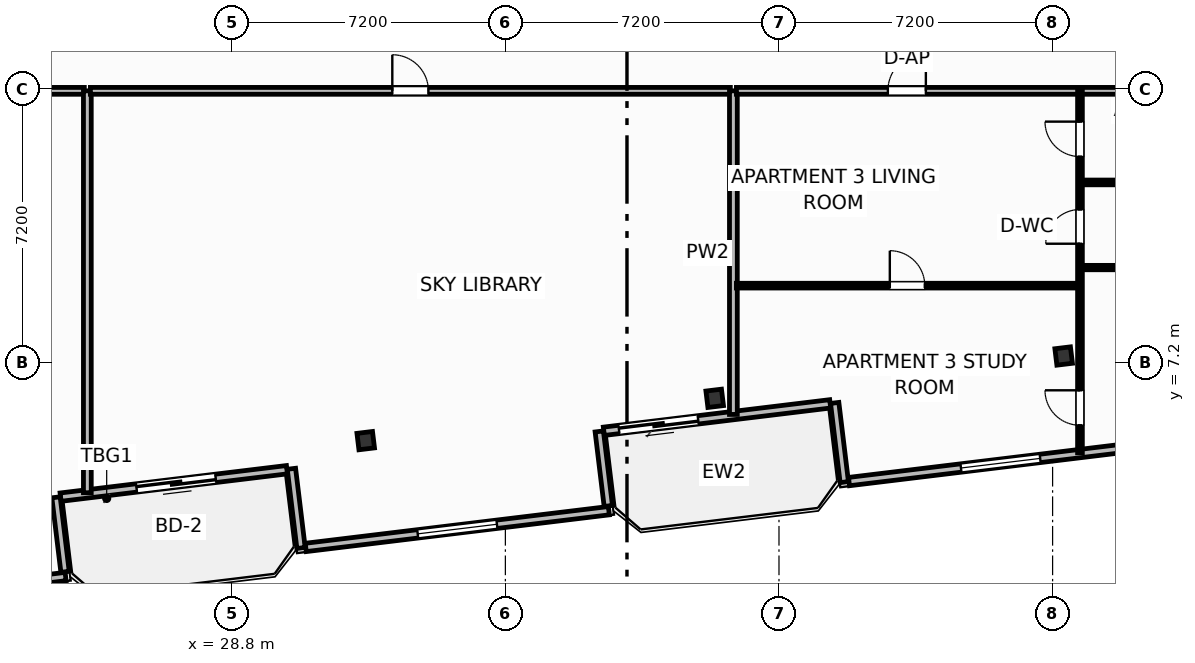
"""IFC4 building model, lengths in metres.
Left out: names, types, materials, properties, quantities, classifications, styles, units other than length and angle.
Written with IfcOpenShell. Run it as: python <this file> out.ifc"""

import sys

from ifc_helpers import new_model, si_unit, direction, frame, frame_2d, origin, origin_2d, place, context, subcontext, project, spatial, rectangle, i_section, extrude, element, fill, save


model = new_model("IFC4")
c1 = context("Model", 3, precision=1e-05, world=origin(), true_north=direction((0.0, 1.0)))
c2 = subcontext(c1, "Body", "Model", "MODEL_VIEW")
j1 = project(units=[si_unit("LENGTHUNIT", "METRE"), si_unit("PLANEANGLEUNIT", "RADIAN")], contexts=[c1])
p1 = place(None, origin())
s1 = spatial("IfcSite", under=j1, at=p1, CompositionType="ELEMENT")
p2 = place(p1, origin())
s2 = spatial("IfcBuilding", under=s1, at=p2, CompositionType="ELEMENT")
p3 = place(p2, frame((0.0, 0.0, 182.0)))
s3 = spatial("IfcBuildingStorey", under=s2, at=p3, CompositionType="ELEMENT", Elevation=182.0)
for number, where, z_axis, x_axis in (
    (1, (32.325, 5.146, 0.0), (0.0, 0.0, 1.0), (0.993, 0.12, 0.0)),
    (2, (41.508, 6.26, 0.0), (0.0, 0.0, 1.0), (0.993, 0.12, 0.0)),
    (3, (50.691, 7.373, 0.0), (0.0, 0.0, 1.0), (0.993, 0.12, 0.0)),
):
    element("IfcColumn", number, at=place(p3, frame(where, z_axis=z_axis, x_axis=x_axis)), inside=s3, PredefinedType="COLUMN", context=c2, shape_type="SweptSolid", body=[
        extrude(i_section(OverallWidth=0.412, OverallDepth=0.435, WebThickness=0.036, FlangeThickness=0.057, FilletRadius=0.025, at=origin_2d()), origin(), (0.0, 0.0, 1.0), 3.7),
    ])
p4 = place(p3, frame((30.252, 4.381, 0.0), z_axis=(0.0, 0.0, 1.0), x_axis=(-0.992735402148, -0.120318000826, 0.0)))
e4 = element("IfcWall", 4, at=p4, inside=s3, PredefinedType="SOLIDWALL", context=c2, shape_type="SweptSolid", body=[
    extrude(rectangle(XDim=6.0, YDim=0.22, at=frame_2d((3.0, 0.0))), origin(), (0.0, 0.0, 1.0), 2.73),
])
p5 = place(p4, frame((1.888, 0.0, 0.0)))
e5 = element("IfcOpeningElement", 5, at=p5, cuts=e4, PredefinedType="OPENING", context=c2, shape_type="SweptSolid", body=[
    extrude(rectangle(XDim=2.1, YDim=2.3, at=frame_2d((1.05, 1.15))), frame((0.0, 0.12, 0.0), z_axis=(0.0, -1.0, 0.0), x_axis=(1.0, 0.0, 0.0)), (0.0, 0.0, 1.0), 0.24),
])
p6 = place(p3, frame((44.548, 6.114, 0.0), z_axis=(0.0, 0.0, 1.0), x_axis=(-0.992735402148, -0.120318000826, 0.0)))
e6 = element("IfcWall", 6, at=p6, inside=s3, PredefinedType="SOLIDWALL", context=c2, shape_type="SweptSolid", body=[
    extrude(rectangle(XDim=6.0, YDim=0.22, at=frame_2d((3.0, 0.0))), origin(), (0.0, 0.0, 1.0), 2.73),
])
p7 = place(p6, frame((3.5, 0.0, 0.0)))
e7 = element("IfcOpeningElement", 7, at=p7, cuts=e6, PredefinedType="OPENING", context=c2, shape_type="SweptSolid", body=[
    extrude(rectangle(XDim=2.1, YDim=2.3, at=frame_2d((1.05, 1.15))), frame((0.0, 0.12, 0.0), z_axis=(0.0, -1.0, 0.0), x_axis=(1.0, 0.0, 0.0)), (0.0, 0.0, 1.0), 0.24),
])
p8 = place(p3, frame((11.972, 0.06, 0.0), z_axis=(0.0, 0.0, 1.0), x_axis=(0.992732021049, 0.120345894751, 0.0)))
e8 = element("IfcWall", 8, at=p8, inside=s3, PredefinedType="SOLIDWALL", context=c2, shape_type="SweptSolid", body=[
    extrude(rectangle(XDim=12.547, YDim=0.22, at=frame_2d((6.274, 0.0))), origin(), (0.0, 0.0, 1.0), 2.73),
])
p9 = place(p8, frame((5.224, 0.0, 0.8)))
e9 = element("IfcOpeningElement", 9, at=p9, cuts=e8, PredefinedType="OPENING", context=c2, shape_type="SweptSolid", body=[
    extrude(rectangle(XDim=2.1, YDim=1.75, at=frame_2d((1.05, 0.875))), frame((0.0, 0.12, 0.0), z_axis=(0.0, -1.0, 0.0), x_axis=(1.0, 0.0, 0.0)), (0.0, 0.0, 1.0), 0.24),
])
p10 = place(p3, frame((24.413, 1.694, 0.0), z_axis=(0.0, 0.0, 1.0), x_axis=(-0.120290754542, 0.992738703976, 0.0)))
e10 = element("IfcWall", 10, at=p10, inside=s3, PredefinedType="SOLIDWALL", context=c2, shape_type="SweptSolid", body=[
    extrude(rectangle(XDim=1.975, YDim=0.22, at=frame_2d((0.987, 0.0))), origin(), (0.0, 0.0, 1.0), 2.73),
])
p11 = place(p3, frame((30.37, 4.406, 0.0), z_axis=(0.0, 0.0, 1.0), x_axis=(0.120327895535, -0.992734202874, 0.0)))
e11 = element("IfcWall", 11, at=p11, inside=s3, PredefinedType="SOLIDWALL", context=c2, shape_type="SweptSolid", body=[
    extrude(rectangle(XDim=2.1, YDim=0.22, at=frame_2d((1.05, 0.0))), origin(), (0.0, 0.0, 1.0), 2.73),
])
p12 = place(p3, frame((30.747, 2.336, 0.0), z_axis=(0.0, 0.0, 1.0), x_axis=(0.992731032022, 0.120354052946, 0.0)))
e12 = element("IfcWall", 12, at=p12, inside=s3, PredefinedType="SOLIDWALL", context=c2, shape_type="SweptSolid", body=[
    extrude(rectangle(XDim=8.035, YDim=0.22, at=frame_2d((4.018, 0.0))), origin(), (0.0, 0.0, 1.0), 2.73),
])
p13 = place(p12, frame((2.968, 0.0, 0.8)))
e13 = element("IfcOpeningElement", 13, at=p13, cuts=e12, PredefinedType="OPENING", context=c2, shape_type="SweptSolid", body=[
    extrude(rectangle(XDim=2.1, YDim=1.75, at=frame_2d((1.05, 0.875))), frame((0.0, 0.12, 0.0), z_axis=(0.0, -1.0, 0.0), x_axis=(1.0, 0.0, 0.0)), (0.0, 0.0, 1.0), 0.24),
])
p14 = place(p3, frame((38.709, 3.427, 0.0), z_axis=(0.0, 0.0, 1.0), x_axis=(-0.120397815541, 0.992725725472, 0.0)))
e14 = element("IfcWall", 14, at=p14, inside=s3, PredefinedType="SOLIDWALL", context=c2, shape_type="SweptSolid", body=[
    extrude(rectangle(XDim=1.975, YDim=0.22, at=frame_2d((0.988, 0.0))), origin(), (0.0, 0.0, 1.0), 2.73),
])
p15 = place(p3, frame((44.666, 6.138, 0.0), z_axis=(0.0, 0.0, 1.0), x_axis=(0.120327895535, -0.992734202874, 0.0)))
e15 = element("IfcWall", 15, at=p15, inside=s3, PredefinedType="SOLIDWALL", context=c2, shape_type="SweptSolid", body=[
    extrude(rectangle(XDim=2.1, YDim=0.22, at=frame_2d((1.05, 0.0))), origin(), (0.0, 0.0, 1.0), 2.73),
])
p16 = place(p3, frame((45.042, 4.069, 0.0), z_axis=(0.0, 0.0, 1.0), x_axis=(0.992731032022, 0.120354052946, 0.0)))
e16 = element("IfcWall", 16, at=p16, inside=s3, PredefinedType="SOLIDWALL", context=c2, shape_type="SweptSolid", body=[
    extrude(rectangle(XDim=8.035, YDim=0.22, at=frame_2d((4.018, 0.0))), origin(), (0.0, 0.0, 1.0), 2.73),
])
p17 = place(p16, frame((2.968, 0.0, 0.8)))
e17 = element("IfcOpeningElement", 17, at=p17, cuts=e16, PredefinedType="OPENING", context=c2, shape_type="SweptSolid", body=[
    extrude(rectangle(XDim=2.1, YDim=1.75, at=frame_2d((1.05, 0.875))), frame((0.0, 0.12, 0.0), z_axis=(0.0, -1.0, 0.0), x_axis=(1.0, 0.0, 0.0)), (0.0, 0.0, 1.0), 0.24),
])
p18 = place(p3, frame((5.15, 14.35, 0.0), z_axis=(0.0, 0.0, 1.0), x_axis=(1.0, 0.0, 0.0)))
e18 = element("IfcWall", 18, at=p18, inside=s3, PredefinedType="PARTITIONING", context=c2, shape_type="SweptSolid", body=[
    extrude(rectangle(XDim=19.77, YDim=0.18, at=frame_2d((9.885, 0.0))), origin(), (0.0, 0.0, 1.0), 3.45),
])
p19 = place(p18, frame((12.575, 0.0, 0.0)))
e19 = element("IfcOpeningElement", 19, at=p19, cuts=e18, PredefinedType="OPENING", context=c2, shape_type="SweptSolid", body=[
    extrude(rectangle(XDim=0.95, YDim=2.05, at=frame_2d((0.475, 1.025))), frame((0.0, 0.1, 0.0), z_axis=(0.0, -1.0, 0.0), x_axis=(1.0, 0.0, 0.0)), (0.0, 0.0, 1.0), 0.2),
])
p20 = place(p3, frame((25.0, 3.775, 0.0), z_axis=(0.0, 0.0, 1.0), x_axis=(0.0, 1.0, 0.0)))
e20 = element("IfcWall", 20, at=p20, inside=s3, PredefinedType="PARTITIONING", context=c2, shape_type="SweptSolid", body=[
    extrude(rectangle(XDim=10.575, YDim=0.205, at=frame_2d((5.288, 0.0))), origin(), (0.0, 0.0, 1.0), 3.45),
])
p21 = place(p3, frame((25.08, 14.35, 0.0), z_axis=(0.0, 0.0, 1.0), x_axis=(1.0, 0.0, 0.0)))
e21 = element("IfcWall", 21, at=p21, inside=s3, PredefinedType="PARTITIONING", context=c2, shape_type="SweptSolid", body=[
    extrude(rectangle(XDim=16.84, YDim=0.18, at=frame_2d((8.42, 0.0))), origin(), (0.0, 0.0, 1.0), 3.45),
])
p22 = place(p21, frame((7.945, 0.0, 0.0)))
e22 = element("IfcOpeningElement", 22, at=p22, cuts=e21, PredefinedType="OPENING", context=c2, shape_type="SweptSolid", body=[
    extrude(rectangle(XDim=0.95, YDim=2.05, at=frame_2d((0.475, 1.025))), frame((0.0, 0.1, 0.0), z_axis=(0.0, -1.0, 0.0), x_axis=(1.0, 0.0, 0.0)), (0.0, 0.0, 1.0), 0.2),
])
p23 = place(p3, frame((42.0, 5.835, 0.0), z_axis=(0.0, 0.0, 1.0), x_axis=(0.0, 1.0, 0.0)))
e23 = element("IfcWall", 23, at=p23, inside=s3, PredefinedType="PARTITIONING", context=c2, shape_type="SweptSolid", body=[
    extrude(rectangle(XDim=8.515, YDim=0.205, at=frame_2d((4.257, 0.0))), origin(), (0.0, 0.0, 1.0), 2.662),
])
p24 = place(p3, frame((42.08, 9.224, 0.0), z_axis=(0.0, 0.0, 1.0), x_axis=(1.0, 0.0, 0.0)))
e24 = element("IfcWall", 24, at=p24, inside=s3, PredefinedType="PARTITIONING", context=c2, shape_type="SweptSolid", body=[
    extrude(rectangle(XDim=8.97, YDim=0.125, at=frame_2d((4.485, 0.0))), origin(), (0.0, 0.0, 1.0), 3.45),
])
p25 = place(p24, frame((4.037, 0.0, 0.0)))
e25 = element("IfcOpeningElement", 25, at=p25, cuts=e24, PredefinedType="OPENING", context=c2, shape_type="SweptSolid", body=[
    extrude(rectangle(XDim=0.92, YDim=2.05, at=frame_2d((0.46, 1.025))), frame((0.0, 0.073, 0.0), z_axis=(0.0, -1.0, 0.0), x_axis=(1.0, 0.0, 0.0)), (0.0, 0.0, 1.0), 0.145),
])
p26 = place(p3, frame((42.08, 14.35, 0.0), z_axis=(0.0, 0.0, 1.0), x_axis=(1.0, 0.0, 0.0)))
e26 = element("IfcWall", 26, at=p26, inside=s3, PredefinedType="PARTITIONING", context=c2, shape_type="SweptSolid", body=[
    extrude(rectangle(XDim=13.84, YDim=0.18, at=frame_2d((6.92, 0.0))), origin(), (0.0, 0.0, 1.0), 3.45),
])
p27 = place(p26, frame((3.985, 0.0, 0.0)))
e27 = element("IfcOpeningElement", 27, at=p27, cuts=e26, PredefinedType="OPENING", context=c2, shape_type="SweptSolid", body=[
    extrude(rectangle(XDim=1.0, YDim=2.2, at=frame_2d((0.5, 1.1))), frame((0.0, 0.1, 0.0), z_axis=(0.0, -1.0, 0.0), x_axis=(1.0, 0.0, 0.0)), (0.0, 0.0, 1.0), 0.2),
])
p28 = place(p3, frame((51.12, 4.826, 0.0), z_axis=(0.0, 0.0, 1.0), x_axis=(0.0, 1.0, 0.0)))
e28 = element("IfcWall", 28, at=p28, inside=s3, PredefinedType="PARTITIONING", context=c2, shape_type="SweptSolid", body=[
    extrude(rectangle(XDim=9.524, YDim=0.125, at=frame_2d((4.762, 0.0))), origin(), (0.0, 0.0, 1.0), 2.662),
])
p29 = place(p28, frame((0.725, 0.0, 0.0)))
e29 = element("IfcOpeningElement", 29, at=p29, cuts=e28, PredefinedType="OPENING", context=c2, shape_type="SweptSolid", body=[
    extrude(rectangle(XDim=0.92, YDim=2.05, at=frame_2d((0.46, 1.025))), frame((0.0, 0.073, 0.0), z_axis=(0.0, -1.0, 0.0), x_axis=(1.0, 0.0, 0.0)), (0.0, 0.0, 1.0), 0.145),
])
p30 = place(p28, frame((5.502, 0.0, 0.0)))
e30 = element("IfcOpeningElement", 30, at=p30, cuts=e28, PredefinedType="OPENING", context=c2, shape_type="SweptSolid", body=[
    extrude(rectangle(XDim=0.9, YDim=2.05, at=frame_2d((0.45, 1.025))), frame((0.0, 0.073, 0.0), z_axis=(0.0, -1.0, 0.0), x_axis=(1.0, 0.0, 0.0)), (0.0, 0.0, 1.0), 0.145),
])
p31 = place(p28, frame((7.794, 0.0, 0.0)))
e31 = element("IfcOpeningElement", 31, at=p31, cuts=e28, PredefinedType="OPENING", context=c2, shape_type="SweptSolid", body=[
    extrude(rectangle(XDim=0.92, YDim=2.05, at=frame_2d((0.46, 1.025))), frame((0.0, 0.073, 0.0), z_axis=(0.0, -1.0, 0.0), x_axis=(1.0, 0.0, 0.0)), (0.0, 0.0, 1.0), 0.145),
])
p32 = place(p3, frame((51.19, 11.94, 0.0), z_axis=(0.0, 0.0, 1.0), x_axis=(1.0, 0.0, 0.0)))
e32 = element("IfcWall", 32, at=p32, inside=s3, PredefinedType="PARTITIONING", context=c2, shape_type="SweptSolid", body=[
    extrude(rectangle(XDim=4.73, YDim=0.125, at=frame_2d((2.365, 0.0))), origin(), (0.0, 0.0, 1.0), 3.018),
])
p33 = place(p3, frame((51.19, 9.7, 0.0), z_axis=(0.0, 0.0, 1.0), x_axis=(1.0, 0.0, 0.0)))
e33 = element("IfcWall", 33, at=p33, inside=s3, PredefinedType="PARTITIONING", context=c2, shape_type="SweptSolid", body=[
    extrude(rectangle(XDim=4.73, YDim=0.115, at=frame_2d((2.365, 0.0))), origin(), (0.0, 0.0, 1.0), 3.45),
])
p34 = place(p5, origin())
e34 = element("IfcDoor", 34, at=p34, inside=s3, OperationType="SLIDING_TO_LEFT", PredefinedType="DOOR", context=c2, shape_type="SweptSolid", body=[
    extrude(rectangle(XDim=2.1, YDim=2.3, at=frame_2d((1.05, 1.15))), frame((0.0, 0.025, 0.0), z_axis=(0.0, -1.0, 0.0), x_axis=(1.0, 0.0, 0.0)), (0.0, 0.0, 1.0), 0.05),
])
fill(e5, e34)
p35 = place(p7, origin())
e35 = element("IfcDoor", 35, at=p35, inside=s3, OperationType="SLIDING_TO_LEFT", PredefinedType="DOOR", context=c2, shape_type="SweptSolid", body=[
    extrude(rectangle(XDim=2.1, YDim=2.3, at=frame_2d((1.05, 1.15))), frame((0.0, 0.025, 0.0), z_axis=(0.0, -1.0, 0.0), x_axis=(1.0, 0.0, 0.0)), (0.0, 0.0, 1.0), 0.05),
])
fill(e7, e35)
p36 = place(p13, origin())
e36 = element("IfcWindow", 36, at=p36, inside=s3, PartitioningType="SINGLE_PANEL", PredefinedType="WINDOW", context=c2, shape_type="SweptSolid", body=[
    extrude(rectangle(XDim=2.1, YDim=1.75, at=frame_2d((1.05, 0.875))), frame((0.0, 0.03, 0.0), z_axis=(0.0, -1.0, 0.0), x_axis=(1.0, 0.0, 0.0)), (0.0, 0.0, 1.0), 0.06),
])
fill(e13, e36)
p37 = place(p17, origin())
e37 = element("IfcWindow", 37, at=p37, inside=s3, PartitioningType="SINGLE_PANEL", PredefinedType="WINDOW", context=c2, shape_type="SweptSolid", body=[
    extrude(rectangle(XDim=2.1, YDim=1.75, at=frame_2d((1.05, 0.875))), frame((0.0, 0.03, 0.0), z_axis=(0.0, -1.0, 0.0), x_axis=(1.0, 0.0, 0.0)), (0.0, 0.0, 1.0), 0.06),
])
fill(e17, e37)
p38 = place(p22, origin())
e38 = element("IfcDoor", 38, at=p38, inside=s3, OperationType="SINGLE_SWING_LEFT", PredefinedType="DOOR", context=c2, shape_type="SweptSolid", body=[
    extrude(rectangle(XDim=0.95, YDim=2.05, at=frame_2d((0.475, 1.025))), frame((0.0, 0.025, 0.0), z_axis=(0.0, -1.0, 0.0), x_axis=(1.0, 0.0, 0.0)), (0.0, 0.0, 1.0), 0.05),
])
fill(e22, e38)
p39 = place(p25, origin())
e39 = element("IfcDoor", 39, at=p39, inside=s3, OperationType="SINGLE_SWING_LEFT", PredefinedType="DOOR", context=c2, shape_type="SweptSolid", body=[
    extrude(rectangle(XDim=0.92, YDim=2.05, at=frame_2d((0.46, 1.025))), frame((0.0, 0.025, 0.0), z_axis=(0.0, -1.0, 0.0), x_axis=(1.0, 0.0, 0.0)), (0.0, 0.0, 1.0), 0.05),
])
fill(e25, e39)
p40 = place(p27, origin())
e40 = element("IfcDoor", 40, at=p40, inside=s3, OperationType="SINGLE_SWING_RIGHT", PredefinedType="DOOR", context=c2, shape_type="SweptSolid", body=[
    extrude(rectangle(XDim=1.0, YDim=2.2, at=frame_2d((0.5, 1.1))), frame((0.0, 0.025, 0.0), z_axis=(0.0, -1.0, 0.0), x_axis=(1.0, 0.0, 0.0)), (0.0, 0.0, 1.0), 0.05),
])
fill(e27, e40)
p41 = place(p29, origin())
e41 = element("IfcDoor", 41, at=p41, inside=s3, OperationType="SINGLE_SWING_RIGHT", PredefinedType="DOOR", context=c2, shape_type="SweptSolid", body=[
    extrude(rectangle(XDim=0.92, YDim=2.05, at=frame_2d((0.46, 1.025))), frame((0.0, 0.025, 0.0), z_axis=(0.0, -1.0, 0.0), x_axis=(1.0, 0.0, 0.0)), (0.0, 0.0, 1.0), 0.05),
])
fill(e29, e41)
p42 = place(p30, origin())
e42 = element("IfcDoor", 42, at=p42, inside=s3, OperationType="SINGLE_SWING_LEFT", PredefinedType="DOOR", context=c2, shape_type="SweptSolid", body=[
    extrude(rectangle(XDim=0.9, YDim=2.05, at=frame_2d((0.45, 1.025))), frame((0.0, 0.025, 0.0), z_axis=(0.0, -1.0, 0.0), x_axis=(1.0, 0.0, 0.0)), (0.0, 0.0, 1.0), 0.05),
])
fill(e30, e42)
p43 = place(p31, origin())
e43 = element("IfcDoor", 43, at=p43, inside=s3, OperationType="SINGLE_SWING_RIGHT", PredefinedType="DOOR", context=c2, shape_type="SweptSolid", body=[
    extrude(rectangle(XDim=0.92, YDim=2.05, at=frame_2d((0.46, 1.025))), frame((0.0, 0.025, 0.0), z_axis=(0.0, -1.0, 0.0), x_axis=(1.0, 0.0, 0.0)), (0.0, 0.0, 1.0), 0.05),
])
fill(e31, e43)
save(model, sys.argv[1])
